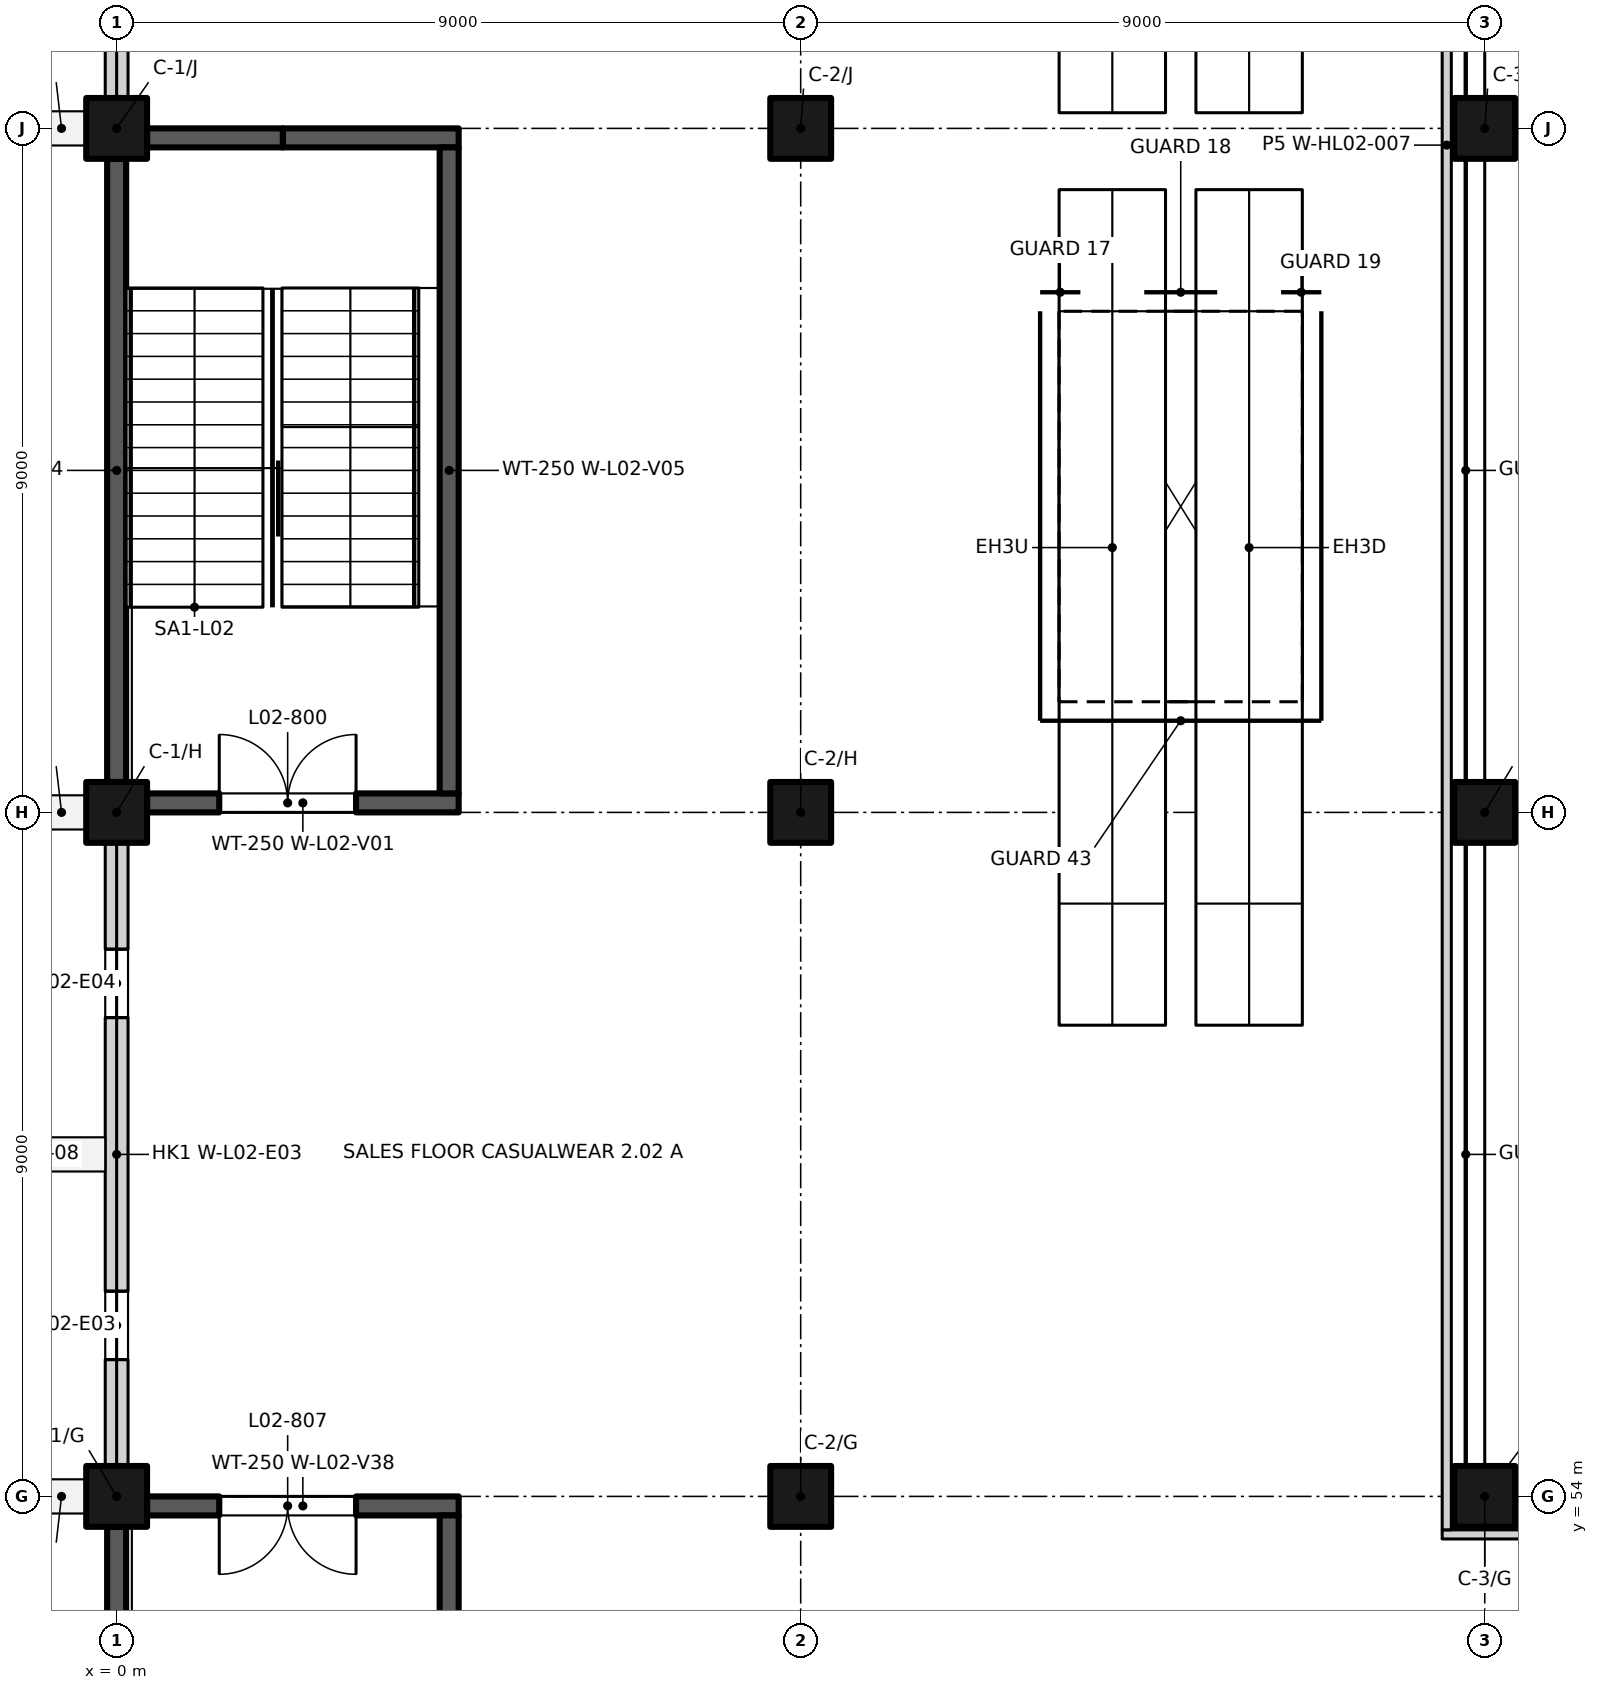
"""IFC4 building model, lengths in metres.
Left out: names, types, materials, properties, quantities, classifications, styles, units other than length and angle.
Written with IfcOpenShell. Run it as: python <this file> out.ifc"""

import sys

from ifc_helpers import new_model, si_unit, direction, frame, frame_2d, origin, origin_2d, place, context, subcontext, project, spatial, rectangle, extrude, element, fill, save


model = new_model("IFC4")
c1 = context("Model", 3, precision=1e-05, world=origin(), true_north=direction((0.0, 1.0)))
c2 = subcontext(c1, "Body", "Model", "MODEL_VIEW")
j1 = project(units=[si_unit("LENGTHUNIT", "METRE"), si_unit("PLANEANGLEUNIT", "RADIAN")], contexts=[c1])
p1 = place(None, origin())
s1 = spatial("IfcSite", under=j1, at=p1, CompositionType="ELEMENT")
p2 = place(p1, origin())
s2 = spatial("IfcBuilding", under=s1, at=p2, CompositionType="ELEMENT")
p3 = place(p2, frame((0.0, 0.0, 10.5)))
s3 = spatial("IfcBuildingStorey", under=s2, at=p3, CompositionType="ELEMENT", Elevation=10.5)
for number, where, z_axis, x_axis in (
    (1, (0.0, 54.0, 0.0), (0.0, 0.0, 1.0), (1.0, 0.0, 0.0)),
    (2, (9.0, 54.0, 0.0), (0.0, 0.0, 1.0), (1.0, 0.0, 0.0)),
    (3, (18.0, 54.0, 0.0), (0.0, 0.0, 1.0), (1.0, 0.0, 0.0)),
    (4, (0.0, 63.0, 0.0), (0.0, 0.0, 1.0), (1.0, 0.0, 0.0)),
    (5, (9.0, 63.0, 0.0), (0.0, 0.0, 1.0), (1.0, 0.0, 0.0)),
    (6, (18.0, 63.0, 0.0), (0.0, 0.0, 1.0), (1.0, 0.0, 0.0)),
    (7, (0.0, 72.0, 0.0), (0.0, 0.0, 1.0), (1.0, 0.0, 0.0)),
    (8, (9.0, 72.0, 0.0), (0.0, 0.0, 1.0), (1.0, 0.0, 0.0)),
    (9, (18.0, 72.0, 0.0), (0.0, 0.0, 1.0), (1.0, 0.0, 0.0)),
):
    element("IfcColumn", number, at=place(p3, frame(where, z_axis=z_axis, x_axis=x_axis)), inside=s3, PredefinedType="COLUMN", context=c2, shape_type="SweptSolid", body=[
        extrude(rectangle(XDim=0.8, YDim=0.8, at=origin_2d()), origin(), (0.0, 0.0, 1.0), 4.5),
    ])
p4 = place(p3, frame((0.4, 63.125, 0.0), z_axis=(0.0, 0.0, 1.0), x_axis=(1.0, 0.0, 0.0)))
e10 = element("IfcWall", 10, at=p4, inside=s3, PredefinedType="SHEAR", context=c2, shape_type="SweptSolid", body=[
    extrude(rectangle(XDim=4.1, YDim=0.25, at=frame_2d((2.05, 0.0))), origin(), (0.0, 0.0, 1.0), 4.5),
])
p5 = place(p4, frame((0.95, 0.0, 0.0)))
e11 = element("IfcOpeningElement", 11, at=p5, cuts=e10, PredefinedType="OPENING", context=c2, shape_type="SweptSolid", body=[
    extrude(rectangle(XDim=1.8, YDim=2.1, at=frame_2d((0.9, 1.05))), frame((0.0, 0.135, 0.0), z_axis=(0.0, -1.0, 0.0), x_axis=(1.0, 0.0, 0.0)), (0.0, 0.0, 1.0), 0.27),
])
p6 = place(p3, frame((0.4, 71.875, 0.0), z_axis=(0.0, 0.0, 1.0), x_axis=(1.0, 0.0, 0.0)))
e12 = element("IfcWall", 12, at=p6, inside=s3, PredefinedType="SHEAR", context=c2, shape_type="SweptSolid", body=[
    extrude(rectangle(XDim=1.788, YDim=0.25, at=frame_2d((0.894, 0.0))), origin(), (0.0, 0.0, 1.0), 4.5),
])
p7 = place(p3, frame((2.188, 71.875, 0.0), z_axis=(0.0, 0.0, 1.0), x_axis=(1.0, 0.0, 0.0)))
e13 = element("IfcWall", 13, at=p7, inside=s3, PredefinedType="SHEAR", context=c2, shape_type="SweptSolid", body=[
    extrude(rectangle(XDim=2.312, YDim=0.25, at=frame_2d((1.156, 0.0))), origin(), (0.0, 0.0, 1.0), 4.5),
])
p8 = place(p3, frame((0.0, 63.4, 0.0), z_axis=(0.0, 0.0, 1.0), x_axis=(0.0, 1.0, 0.0)))
e14 = element("IfcWall", 14, at=p8, inside=s3, PredefinedType="SHEAR", context=c2, shape_type="SweptSolid", body=[
    extrude(rectangle(XDim=8.2, YDim=0.25, at=frame_2d((4.1, 0.0))), origin(), (0.0, 0.0, 1.0), 4.5),
])
p9 = place(p3, frame((4.375, 63.25, 0.0), z_axis=(0.0, 0.0, 1.0), x_axis=(0.0, 1.0, 0.0)))
e15 = element("IfcWall", 15, at=p9, inside=s3, PredefinedType="SHEAR", context=c2, shape_type="SweptSolid", body=[
    extrude(rectangle(XDim=8.5, YDim=0.25, at=frame_2d((4.25, 0.0))), origin(), (0.0, 0.0, 1.0), 4.5),
])
p10 = place(p3, frame((0.4, 53.875, 0.0), z_axis=(0.0, 0.0, 1.0), x_axis=(1.0, 0.0, 0.0)))
e16 = element("IfcWall", 16, at=p10, inside=s3, PredefinedType="SHEAR", context=c2, shape_type="SweptSolid", body=[
    extrude(rectangle(XDim=4.1, YDim=0.25, at=frame_2d((2.05, 0.0))), origin(), (0.0, 0.0, 1.0), 4.5),
])
p11 = place(p10, frame((2.75, 0.0, 0.0), z_axis=(0.0, 0.0, 1.0), x_axis=(-1.0, 0.0, 0.0)))
e17 = element("IfcOpeningElement", 17, at=p11, cuts=e16, PredefinedType="OPENING", context=c2, shape_type="SweptSolid", body=[
    extrude(rectangle(XDim=1.8, YDim=2.1, at=frame_2d((0.9, 1.05))), frame((0.0, 0.135, 0.0), z_axis=(0.0, -1.0, 0.0), x_axis=(1.0, 0.0, 0.0)), (0.0, 0.0, 1.0), 0.27),
])
p12 = place(p3, frame((0.0, 45.4, 0.0), z_axis=(0.0, 0.0, 1.0), x_axis=(0.0, 1.0, 0.0)))
e18 = element("IfcWall", 18, at=p12, inside=s3, PredefinedType="SHEAR", context=c2, shape_type="SweptSolid", body=[
    extrude(rectangle(XDim=8.2, YDim=0.25, at=frame_2d((4.1, 0.0))), origin(), (0.0, 0.0, 1.0), 4.5),
])
p13 = place(p3, frame((4.375, 45.125, 0.0), z_axis=(0.0, 0.0, 1.0), x_axis=(0.0, 1.0, 0.0)))
e19 = element("IfcWall", 19, at=p13, inside=s3, PredefinedType="SHEAR", context=c2, shape_type="SweptSolid", body=[
    extrude(rectangle(XDim=8.625, YDim=0.25, at=frame_2d((4.312, 0.0))), origin(), (0.0, 0.0, 1.0), 4.5),
])
p14 = place(p3, frame((0.0, 54.4, 0.0), z_axis=(0.0, 0.0, 1.0), x_axis=(0.0, 1.0, 0.0)))
e20 = element("IfcWall", 20, at=p14, inside=s3, PredefinedType="SOLIDWALL", context=c2, shape_type="SweptSolid", body=[
    extrude(rectangle(XDim=8.2, YDim=0.3, at=frame_2d((4.1, 0.0))), origin(), (0.0, 0.0, 1.0), 3.7),
])
p15 = place(p14, frame((1.4, 0.0, 0.45)))
e21 = element("IfcOpeningElement", 21, at=p15, cuts=e20, PredefinedType="OPENING", context=c2, shape_type="SweptSolid", body=[
    extrude(rectangle(XDim=0.9, YDim=3.0, at=frame_2d((0.45, 1.5))), frame((0.0, 0.16, 0.0), z_axis=(0.0, -1.0, 0.0), x_axis=(1.0, 0.0, 0.0)), (0.0, 0.0, 1.0), 0.32),
])
p16 = place(p14, frame((5.9, 0.0, 0.45)))
e22 = element("IfcOpeningElement", 22, at=p16, cuts=e20, PredefinedType="OPENING", context=c2, shape_type="SweptSolid", body=[
    extrude(rectangle(XDim=0.9, YDim=3.0, at=frame_2d((0.45, 1.5))), frame((0.0, 0.16, 0.0), z_axis=(0.0, -1.0, 0.0), x_axis=(1.0, 0.0, 0.0)), (0.0, 0.0, 1.0), 0.32),
])
p17 = place(p3, frame((0.0, 72.4, 0.0), z_axis=(0.0, 0.0, 1.0), x_axis=(0.0, 1.0, 0.0)))
e23 = element("IfcWall", 23, at=p17, inside=s3, PredefinedType="SOLIDWALL", context=c2, shape_type="SweptSolid", body=[
    extrude(rectangle(XDim=8.2, YDim=0.3, at=frame_2d((4.1, 0.0))), origin(), (0.0, 0.0, 1.0), 3.7),
])
p18 = place(p17, frame((1.4, 0.0, 0.45)))
e24 = element("IfcOpeningElement", 24, at=p18, cuts=e23, PredefinedType="OPENING", context=c2, shape_type="SweptSolid", body=[
    extrude(rectangle(XDim=0.9, YDim=3.0, at=frame_2d((0.45, 1.5))), frame((0.0, 0.16, 0.0), z_axis=(0.0, -1.0, 0.0), x_axis=(1.0, 0.0, 0.0)), (0.0, 0.0, 1.0), 0.32),
])
p19 = place(p17, frame((5.9, 0.0, 0.45)))
e25 = element("IfcOpeningElement", 25, at=p19, cuts=e23, PredefinedType="OPENING", context=c2, shape_type="SweptSolid", body=[
    extrude(rectangle(XDim=0.9, YDim=3.0, at=frame_2d((0.45, 1.5))), frame((0.0, 0.16, 0.0), z_axis=(0.0, -1.0, 0.0), x_axis=(1.0, 0.0, 0.0)), (0.0, 0.0, 1.0), 0.32),
])
p20 = place(p3, frame((17.44, 53.5, 0.0), z_axis=(0.0, 0.0, 1.0), x_axis=(1.0, 0.0, 0.0)))
e26 = element("IfcWall", 26, at=p20, inside=s3, PredefinedType="PARTITIONING", context=c2, shape_type="SweptSolid", body=[
    extrude(rectangle(XDim=28.12, YDim=0.12, at=frame_2d((14.06, 0.0))), origin(), (0.0, 0.0, 1.0), 3.7),
])
p21 = place(p3, frame((17.5, 53.56, 0.0), z_axis=(0.0, 0.0, 1.0), x_axis=(0.0, 1.0, 0.0)))
e27 = element("IfcWall", 27, at=p21, inside=s3, PredefinedType="PARTITIONING", context=c2, shape_type="SweptSolid", body=[
    extrude(rectangle(XDim=36.565, YDim=0.12, at=frame_2d((18.282, 0.0))), origin(), (0.0, 0.0, 1.0), 3.7),
])
p22 = place(p5, origin())
e28 = element("IfcDoor", 28, at=p22, inside=s3, OperationType="DOUBLE_DOOR_SINGLE_SWING", PredefinedType="DOOR", context=c2, shape_type="SweptSolid", body=[
    extrude(rectangle(XDim=1.8, YDim=2.1, at=frame_2d((0.9, 1.05))), frame((0.0, 0.025, 0.0), z_axis=(0.0, -1.0, 0.0), x_axis=(1.0, 0.0, 0.0)), (0.0, 0.0, 1.0), 0.05),
])
fill(e11, e28)
p23 = place(p11, origin())
e29 = element("IfcDoor", 29, at=p23, inside=s3, OperationType="DOUBLE_DOOR_SINGLE_SWING", PredefinedType="DOOR", context=c2, shape_type="SweptSolid", body=[
    extrude(rectangle(XDim=1.8, YDim=2.1, at=frame_2d((0.9, 1.05))), frame((0.0, 0.025, 0.0), z_axis=(0.0, -1.0, 0.0), x_axis=(1.0, 0.0, 0.0)), (0.0, 0.0, 1.0), 0.05),
])
fill(e17, e29)
p24 = place(p15, origin())
e30 = element("IfcWindow", 30, at=p24, inside=s3, PartitioningType="SINGLE_PANEL", PredefinedType="WINDOW", context=c2, shape_type="SweptSolid", body=[
    extrude(rectangle(XDim=0.9, YDim=3.0, at=frame_2d((0.45, 1.5))), frame((0.0, -0.03, 0.0), z_axis=(0.0, -1.0, 0.0), x_axis=(1.0, 0.0, 0.0)), (0.0, 0.0, 1.0), 0.06),
])
fill(e21, e30)
p25 = place(p16, origin())
e31 = element("IfcWindow", 31, at=p25, inside=s3, PartitioningType="SINGLE_PANEL", PredefinedType="WINDOW", context=c2, shape_type="SweptSolid", body=[
    extrude(rectangle(XDim=0.9, YDim=3.0, at=frame_2d((0.45, 1.5))), frame((0.0, -0.03, 0.0), z_axis=(0.0, -1.0, 0.0), x_axis=(1.0, 0.0, 0.0)), (0.0, 0.0, 1.0), 0.06),
])
fill(e22, e31)
save(model, sys.argv[1])
